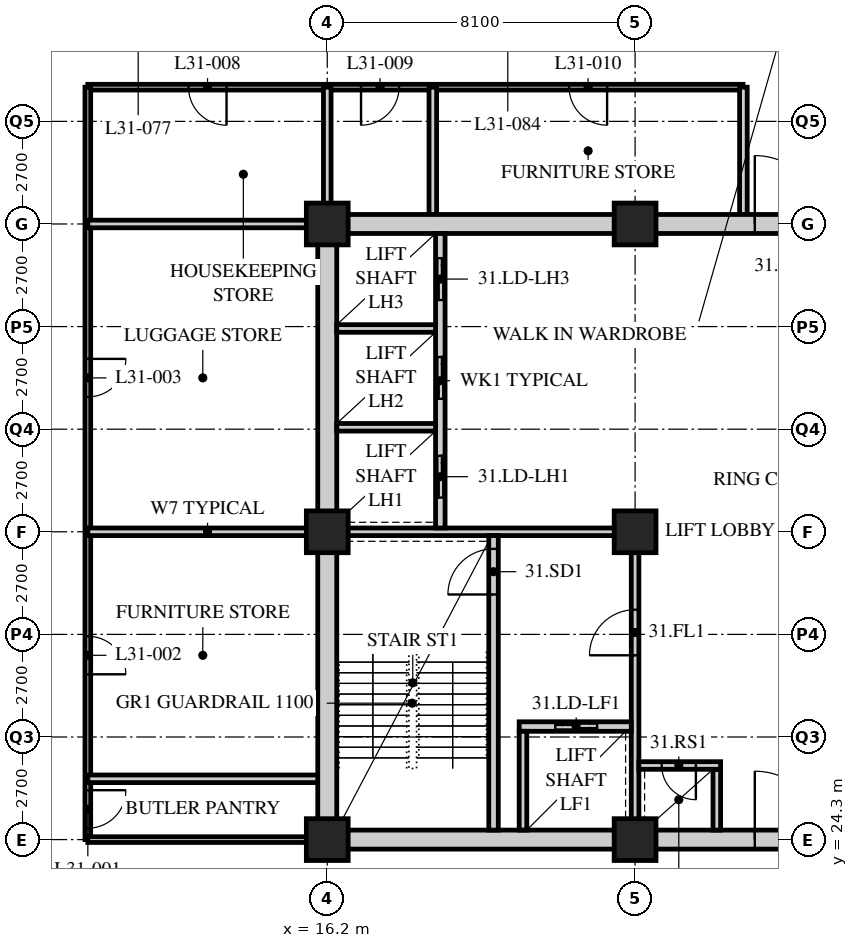
"""IFC4 building model, lengths in metres.
Left out: names, types, materials, properties, quantities, classifications, styles, units other than length and angle.
Written with IfcOpenShell. Run it as: python <this file> out.ifc"""

import sys

from ifc_helpers import new_model, si_unit, direction, frame, frame_2d, origin, origin_2d, place, context, subcontext, project, spatial, rectangle, hollow_rectangle, extrude, element, fill, save


model = new_model("IFC4")
c1 = context("Model", 3, precision=1e-05, world=origin(), true_north=direction((0.0, 1.0)))
c2 = subcontext(c1, "Body", "Model", "MODEL_VIEW")
j1 = project(units=[si_unit("LENGTHUNIT", "METRE"), si_unit("PLANEANGLEUNIT", "RADIAN")], contexts=[c1])
p1 = place(None, origin())
s1 = spatial("IfcSite", under=j1, at=p1, CompositionType="ELEMENT")
p2 = place(p1, origin())
s2 = spatial("IfcBuilding", under=s1, at=p2, CompositionType="ELEMENT")
p3 = place(p2, frame((0.0, 0.0, 123.8)))
s3 = spatial("IfcBuildingStorey", under=s2, at=p3, CompositionType="ELEMENT", Elevation=123.8)
for number, where, z_axis, x_axis in (
    (1, (16.2, 24.3, 0.0), (0.0, 0.0, 1.0), (1.0, 0.0, 0.0)),
    (2, (16.2, 32.4, 0.0), (0.0, 0.0, 1.0), (1.0, 0.0, 0.0)),
    (3, (16.2, 40.5, 0.0), (0.0, 0.0, 1.0), (1.0, 0.0, 0.0)),
    (4, (24.3, 24.3, 0.0), (0.0, 0.0, 1.0), (1.0, 0.0, 0.0)),
    (5, (24.3, 32.4, 0.0), (0.0, 0.0, 1.0), (1.0, 0.0, 0.0)),
    (6, (24.3, 40.5, 0.0), (0.0, 0.0, 1.0), (1.0, 0.0, 0.0)),
):
    element("IfcColumn", number, at=place(p3, frame(where, z_axis=z_axis, x_axis=x_axis)), inside=s3, PredefinedType="COLUMN", context=c2, shape_type="SweptSolid", body=[
        extrude(hollow_rectangle(XDim=1.1, YDim=1.1, WallThickness=0.1, at=origin_2d()), origin(), (0.0, 0.0, 1.0), 3.4),
    ])
p4 = place(p3, frame((27.14, 44.1, 0.0), z_axis=(0.0, 0.0, 1.0), x_axis=(-1.0, 0.0, 0.0)))
e7 = element("IfcWall", 7, at=p4, inside=s3, PredefinedType="PARTITIONING", context=c2, shape_type="SweptSolid", body=[
    extrude(rectangle(XDim=17.24, YDim=0.15, at=frame_2d((8.62, 0.0))), origin(), (0.0, 0.0, 1.0), 3.19),
])
p5 = place(p4, frame((13.59, 0.0, 0.0)))
e8 = element("IfcOpeningElement", 8, at=p5, cuts=e7, PredefinedType="OPENING", context=c2, shape_type="SweptSolid", body=[
    extrude(rectangle(XDim=1.0, YDim=2.1, at=frame_2d((0.5, 1.05))), frame((0.0, 0.085, 0.0), z_axis=(0.0, -1.0, 0.0), x_axis=(1.0, 0.0, 0.0)), (0.0, 0.0, 1.0), 0.17),
])
p6 = place(p4, frame((9.051, 0.0, 0.0)))
e9 = element("IfcOpeningElement", 9, at=p6, cuts=e7, PredefinedType="OPENING", context=c2, shape_type="SweptSolid", body=[
    extrude(rectangle(XDim=1.0, YDim=2.1, at=frame_2d((0.5, 1.05))), frame((0.0, 0.085, 0.0), z_axis=(0.0, -1.0, 0.0), x_axis=(1.0, 0.0, 0.0)), (0.0, 0.0, 1.0), 0.17),
])
p7 = place(p4, frame((3.576, 0.0, 0.0)))
e10 = element("IfcOpeningElement", 10, at=p7, cuts=e7, PredefinedType="OPENING", context=c2, shape_type="SweptSolid", body=[
    extrude(rectangle(XDim=1.0, YDim=2.1, at=frame_2d((0.5, 1.05))), frame((0.0, 0.085, 0.0), z_axis=(0.0, -1.0, 0.0), x_axis=(1.0, 0.0, 0.0)), (0.0, 0.0, 1.0), 0.17),
])
p8 = place(p3, frame((9.9, 44.1, 0.0), z_axis=(0.0, 0.0, 1.0), x_axis=(0.0, -1.0, 0.0)))
e11 = element("IfcWall", 11, at=p8, inside=s3, PredefinedType="PARTITIONING", context=c2, shape_type="SweptSolid", body=[
    extrude(rectangle(XDim=19.8, YDim=0.15, at=frame_2d((9.9, 0.0))), origin(), (0.0, 0.0, 1.0), 3.19),
])
p9 = place(p8, frame((18.5, 0.0, 0.0)))
e12 = element("IfcOpeningElement", 12, at=p9, cuts=e11, PredefinedType="OPENING", context=c2, shape_type="SweptSolid", body=[
    extrude(rectangle(XDim=1.0, YDim=2.1, at=frame_2d((0.5, 1.05))), frame((0.0, 0.085, 0.0), z_axis=(0.0, -1.0, 0.0), x_axis=(1.0, 0.0, 0.0)), (0.0, 0.0, 1.0), 0.17),
])
p10 = place(p8, frame((14.45, 0.0, 0.0)))
e13 = element("IfcOpeningElement", 13, at=p10, cuts=e11, PredefinedType="OPENING", context=c2, shape_type="SweptSolid", body=[
    extrude(rectangle(XDim=1.0, YDim=2.1, at=frame_2d((0.5, 1.05))), frame((0.0, 0.085, 0.0), z_axis=(0.0, -1.0, 0.0), x_axis=(1.0, 0.0, 0.0)), (0.0, 0.0, 1.0), 0.17),
])
p11 = place(p8, frame((7.15, 0.0, 0.0)))
e14 = element("IfcOpeningElement", 14, at=p11, cuts=e11, PredefinedType="OPENING", context=c2, shape_type="SweptSolid", body=[
    extrude(rectangle(XDim=1.0, YDim=2.1, at=frame_2d((0.5, 1.05))), frame((0.0, 0.085, 0.0), z_axis=(0.0, -1.0, 0.0), x_axis=(1.0, 0.0, 0.0)), (0.0, 0.0, 1.0), 0.17),
])
p12 = place(p3, frame((9.9, 24.3, 0.0), z_axis=(0.0, 0.0, 1.0), x_axis=(1.0, 0.0, 0.0)))
e15 = element("IfcWall", 15, at=p12, inside=s3, PredefinedType="PARTITIONING", context=c2, shape_type="SweptSolid", body=[
    extrude(rectangle(XDim=6.1, YDim=0.15, at=frame_2d((3.05, 0.0))), origin(), (0.0, 0.0, 1.0), 3.19),
])
for number, where, z_axis, x_axis in (
    (16, (9.9, 32.4, 0.0), (0.0, 0.0, 1.0), (1.0, 0.0, 0.0)),
    (17, (9.9, 25.9, 0.0), (0.0, 0.0, 1.0), (1.0, 0.0, 0.0)),
):
    element("IfcWall", number, at=place(p3, frame(where, z_axis=z_axis, x_axis=x_axis)), inside=s3, PredefinedType="SOLIDWALL", context=c2, shape_type="SweptSolid", body=[
        extrude(rectangle(XDim=6.3, YDim=0.2, at=frame_2d((3.15, 0.0))), origin(), (0.0, 0.0, 1.0), 3.19),
    ])
p13 = place(p3, frame((16.2, 40.5, 0.0), z_axis=(0.0, 0.0, 1.0), x_axis=(0.0, 1.0, 0.0)))
e18 = element("IfcWall", 18, at=p13, inside=s3, PredefinedType="SOLIDWALL", context=c2, shape_type="SweptSolid", body=[
    extrude(rectangle(XDim=3.6, YDim=0.2, at=frame_2d((1.8, 0.0))), origin(), (0.0, 0.0, 1.0), 2.578),
])
for number, where, z_axis, x_axis in (
    (19, (18.978, 44.1, 0.0), (0.0, 0.0, 1.0), (0.0, -1.0, 0.0)),
    (20, (27.15, 40.5, 0.0), (0.0, 0.0, 1.0), (0.0, 1.0, 0.0)),
):
    element("IfcWall", number, at=place(p3, frame(where, z_axis=z_axis, x_axis=x_axis)), inside=s3, PredefinedType="SOLIDWALL", context=c2, shape_type="SweptSolid", body=[
        extrude(rectangle(XDim=3.6, YDim=0.2, at=frame_2d((1.8, 0.0))), origin(), (0.0, 0.0, 1.0), 3.19),
    ])
p14 = place(p3, frame((9.9, 40.5, 0.0), z_axis=(0.0, 0.0, 1.0), x_axis=(1.0, 0.0, 0.0)))
e21 = element("IfcWall", 21, at=p14, inside=s3, PredefinedType="SOLIDWALL", context=c2, shape_type="SweptSolid", body=[
    extrude(rectangle(XDim=6.3, YDim=0.2, at=frame_2d((3.15, 0.0))), origin(), (0.0, 0.0, 1.0), 3.19),
])
p15 = place(p3, frame((15.95, 24.3, 0.0), z_axis=(0.0, 0.0, 1.0), x_axis=(1.0, 0.0, 0.0)))
e22 = element("IfcWall", 22, at=p15, inside=s3, PredefinedType="SOLIDWALL", context=c2, shape_type="SweptSolid", body=[
    extrude(rectangle(XDim=24.8, YDim=0.5, at=frame_2d((12.4, 0.0))), origin(), (0.0, 0.0, 1.0), 2.54),
])
p16 = place(p15, frame((11.5, 0.0, 0.0)))
e23 = element("IfcOpeningElement", 23, at=p16, cuts=e22, PredefinedType="OPENING", context=c2, shape_type="SweptSolid", body=[
    extrude(rectangle(XDim=1.8, YDim=2.4, at=frame_2d((0.9, 1.2))), frame((0.0, 0.26, 0.0), z_axis=(0.0, -1.0, 0.0), x_axis=(1.0, 0.0, 0.0)), (0.0, 0.0, 1.0), 0.52),
])
p17 = place(p3, frame((15.95, 40.5, 0.0), z_axis=(0.0, 0.0, 1.0), x_axis=(1.0, 0.0, 0.0)))
e24 = element("IfcWall", 24, at=p17, inside=s3, PredefinedType="SOLIDWALL", context=c2, shape_type="SweptSolid", body=[
    extrude(rectangle(XDim=24.8, YDim=0.5, at=frame_2d((12.4, 0.0))), origin(), (0.0, 0.0, 1.0), 2.54),
])
p18 = place(p17, frame((11.5, 0.0, 0.0)))
e25 = element("IfcOpeningElement", 25, at=p18, cuts=e24, PredefinedType="OPENING", context=c2, shape_type="SweptSolid", body=[
    extrude(rectangle(XDim=1.8, YDim=2.4, at=frame_2d((0.9, 1.2))), frame((0.0, 0.26, 0.0), z_axis=(0.0, -1.0, 0.0), x_axis=(1.0, 0.0, 0.0)), (0.0, 0.0, 1.0), 0.52),
])
p19 = place(p3, frame((16.2, 24.55, 0.0), z_axis=(0.0, 0.0, 1.0), x_axis=(0.0, 1.0, 0.0)))
e26 = element("IfcWall", 26, at=p19, inside=s3, PredefinedType="SOLIDWALL", context=c2, shape_type="SweptSolid", body=[
    extrude(rectangle(XDim=15.7, YDim=0.5, at=frame_2d((7.85, 0.0))), origin(), (0.0, 0.0, 1.0), 2.578),
])
p20 = place(p3, frame((16.45, 32.4, 0.0), z_axis=(0.0, 0.0, 1.0), x_axis=(1.0, 0.0, 0.0)))
e27 = element("IfcWall", 27, at=p20, inside=s3, PredefinedType="SOLIDWALL", context=c2, shape_type="SweptSolid", body=[
    extrude(rectangle(XDim=7.95, YDim=0.2, at=frame_2d((3.975, 0.0))), origin(), (0.0, 0.0, 1.0), 2.578),
])
p21 = place(p3, frame((24.3, 24.55, 0.0), z_axis=(0.0, 0.0, 1.0), x_axis=(0.0, 1.0, 0.0)))
e28 = element("IfcWall", 28, at=p21, inside=s3, PredefinedType="SOLIDWALL", context=c2, shape_type="SweptSolid", body=[
    extrude(rectangle(XDim=7.75, YDim=0.2, at=frame_2d((3.875, 0.0))), origin(), (0.0, 0.0, 1.0), 2.578),
])
p22 = place(p21, frame((4.6, 0.0, 0.0)))
e29 = element("IfcOpeningElement", 29, at=p22, cuts=e28, PredefinedType="OPENING", context=c2, shape_type="SweptSolid", body=[
    extrude(rectangle(XDim=1.2, YDim=2.1, at=frame_2d((0.6, 1.05))), frame((0.0, 0.11, 0.0), z_axis=(0.0, -1.0, 0.0), x_axis=(1.0, 0.0, 0.0)), (0.0, 0.0, 1.0), 0.22),
])
p23 = place(p3, frame((20.575, 24.55, 0.0), z_axis=(0.0, 0.0, 1.0), x_axis=(0.0, 1.0, 0.0)))
e30 = element("IfcWall", 30, at=p23, inside=s3, PredefinedType="SOLIDWALL", context=c2, shape_type="SweptSolid", body=[
    extrude(rectangle(XDim=7.75, YDim=0.25, at=frame_2d((3.875, 0.0))), origin(), (0.0, 0.0, 1.0), 3.19),
])
p24 = place(p23, frame((6.2, 0.0, 0.0)))
e31 = element("IfcOpeningElement", 31, at=p24, cuts=e30, PredefinedType="OPENING", context=c2, shape_type="SweptSolid", body=[
    extrude(rectangle(XDim=1.2, YDim=2.1, at=frame_2d((0.6, 1.05))), frame((0.0, 0.135, 0.0), z_axis=(0.0, -1.0, 0.0), x_axis=(1.0, 0.0, 0.0)), (0.0, 0.0, 1.0), 0.27),
])
p25 = place(p3, frame((21.25, 27.275, 0.0), z_axis=(0.0, 0.0, 1.0), x_axis=(1.0, 0.0, 0.0)))
e32 = element("IfcWall", 32, at=p25, inside=s3, PredefinedType="SOLIDWALL", context=c2, shape_type="SweptSolid", body=[
    extrude(rectangle(XDim=2.95, YDim=0.25, at=frame_2d((1.475, 0.0))), origin(), (0.0, 0.0, 1.0), 3.19),
])
p26 = place(p25, frame((0.95, 0.0, 0.0)))
e33 = element("IfcOpeningElement", 33, at=p26, cuts=e32, PredefinedType="OPENING", context=c2, shape_type="SweptSolid", body=[
    extrude(rectangle(XDim=1.1, YDim=2.4, at=frame_2d((0.55, 1.2))), frame((0.0, 0.135, 0.0), z_axis=(0.0, -1.0, 0.0), x_axis=(1.0, 0.0, 0.0)), (0.0, 0.0, 1.0), 0.27),
])
p27 = place(p3, frame((21.35, 24.55, 0.0), z_axis=(0.0, 0.0, 1.0), x_axis=(0.0, 1.0, 0.0)))
e34 = element("IfcWall", 34, at=p27, inside=s3, PredefinedType="SOLIDWALL", context=c2, shape_type="SweptSolid", body=[
    extrude(rectangle(XDim=2.6, YDim=0.2, at=frame_2d((1.3, 0.0))), origin(), (0.0, 0.0, 1.0), 3.19),
])
p28 = place(p3, frame((19.175, 32.5, 0.0), z_axis=(0.0, 0.0, 1.0), x_axis=(0.0, 1.0, 0.0)))
e35 = element("IfcWall", 35, at=p28, inside=s3, PredefinedType="SOLIDWALL", context=c2, shape_type="SweptSolid", body=[
    extrude(rectangle(XDim=7.75, YDim=0.25, at=frame_2d((3.875, 0.0))), origin(), (0.0, 0.0, 1.0), 3.19),
])
p29 = place(p28, frame((0.8, 0.0, 0.0)))
e36 = element("IfcOpeningElement", 36, at=p29, cuts=e35, PredefinedType="OPENING", context=c2, shape_type="SweptSolid", body=[
    extrude(rectangle(XDim=1.1, YDim=2.4, at=frame_2d((0.55, 1.2))), frame((0.0, 0.135, 0.0), z_axis=(0.0, -1.0, 0.0), x_axis=(1.0, 0.0, 0.0)), (0.0, 0.0, 1.0), 0.27),
])
p30 = place(p28, frame((3.4, 0.0, 0.0)))
e37 = element("IfcOpeningElement", 37, at=p30, cuts=e35, PredefinedType="OPENING", context=c2, shape_type="SweptSolid", body=[
    extrude(rectangle(XDim=1.1, YDim=2.4, at=frame_2d((0.55, 1.2))), frame((0.0, 0.135, 0.0), z_axis=(0.0, -1.0, 0.0), x_axis=(1.0, 0.0, 0.0)), (0.0, 0.0, 1.0), 0.27),
])
p31 = place(p28, frame((6.0, 0.0, 0.0)))
e38 = element("IfcOpeningElement", 38, at=p31, cuts=e35, PredefinedType="OPENING", context=c2, shape_type="SweptSolid", body=[
    extrude(rectangle(XDim=1.1, YDim=2.4, at=frame_2d((0.55, 1.2))), frame((0.0, 0.135, 0.0), z_axis=(0.0, -1.0, 0.0), x_axis=(1.0, 0.0, 0.0)), (0.0, 0.0, 1.0), 0.27),
])
for number, where, z_axis, x_axis in (
    (39, (16.45, 35.15, 0.0), (0.0, 0.0, 1.0), (1.0, 0.0, 0.0)),
    (40, (16.45, 37.75, 0.0), (0.0, 0.0, 1.0), (1.0, 0.0, 0.0)),
):
    element("IfcWall", number, at=place(p3, frame(where, z_axis=z_axis, x_axis=x_axis)), inside=s3, PredefinedType="SOLIDWALL", context=c2, shape_type="SweptSolid", body=[
        extrude(rectangle(XDim=2.6, YDim=0.2, at=frame_2d((1.3, 0.0))), origin(), (0.0, 0.0, 1.0), 3.19),
    ])
p32 = place(p3, frame((26.45, 24.55, 0.0), z_axis=(0.0, 0.0, 1.0), x_axis=(0.0, 1.0, 0.0)))
e41 = element("IfcWall", 41, at=p32, inside=s3, PredefinedType="SOLIDWALL", context=c2, shape_type="SweptSolid", body=[
    extrude(rectangle(XDim=1.6, YDim=0.2, at=frame_2d((0.8, 0.0))), origin(), (0.0, 0.0, 1.0), 3.19),
])
p33 = place(p3, frame((24.4, 26.25, 0.0), z_axis=(0.0, 0.0, 1.0), x_axis=(1.0, 0.0, 0.0)))
e42 = element("IfcWall", 42, at=p33, inside=s3, PredefinedType="SOLIDWALL", context=c2, shape_type="SweptSolid", body=[
    extrude(rectangle(XDim=2.15, YDim=0.2, at=frame_2d((1.075, 0.0))), origin(), (0.0, 0.0, 1.0), 3.19),
])
p34 = place(p33, frame((0.6, 0.0, 0.0)))
e43 = element("IfcOpeningElement", 43, at=p34, cuts=e42, PredefinedType="OPENING", context=c2, shape_type="SweptSolid", body=[
    extrude(rectangle(XDim=0.9, YDim=2.1, at=frame_2d((0.45, 1.05))), frame((0.0, 0.11, 0.0), z_axis=(0.0, -1.0, 0.0), x_axis=(1.0, 0.0, 0.0)), (0.0, 0.0, 1.0), 0.22),
])
p35 = place(p9, origin())
e44 = element("IfcDoor", 44, at=p35, inside=s3, OperationType="SINGLE_SWING_LEFT", PredefinedType="DOOR", context=c2, shape_type="SweptSolid", body=[
    extrude(rectangle(XDim=1.0, YDim=2.1, at=frame_2d((0.5, 1.05))), frame((0.0, 0.025, 0.0), z_axis=(0.0, -1.0, 0.0), x_axis=(1.0, 0.0, 0.0)), (0.0, 0.0, 1.0), 0.05),
])
fill(e12, e44)
p36 = place(p10, origin())
e45 = element("IfcDoor", 45, at=p36, inside=s3, OperationType="SINGLE_SWING_RIGHT", PredefinedType="DOOR", context=c2, shape_type="SweptSolid", body=[
    extrude(rectangle(XDim=1.0, YDim=2.1, at=frame_2d((0.5, 1.05))), frame((0.0, 0.025, 0.0), z_axis=(0.0, -1.0, 0.0), x_axis=(1.0, 0.0, 0.0)), (0.0, 0.0, 1.0), 0.05),
])
fill(e13, e45)
p37 = place(p11, origin())
e46 = element("IfcDoor", 46, at=p37, inside=s3, OperationType="SINGLE_SWING_LEFT", PredefinedType="DOOR", context=c2, shape_type="SweptSolid", body=[
    extrude(rectangle(XDim=1.0, YDim=2.1, at=frame_2d((0.5, 1.05))), frame((0.0, 0.025, 0.0), z_axis=(0.0, -1.0, 0.0), x_axis=(1.0, 0.0, 0.0)), (0.0, 0.0, 1.0), 0.05),
])
fill(e14, e46)
p38 = place(p5, origin())
e47 = element("IfcDoor", 47, at=p38, inside=s3, OperationType="SINGLE_SWING_LEFT", PredefinedType="DOOR", context=c2, shape_type="SweptSolid", body=[
    extrude(rectangle(XDim=1.0, YDim=2.1, at=frame_2d((0.5, 1.05))), frame((0.0, 0.025, 0.0), z_axis=(0.0, -1.0, 0.0), x_axis=(1.0, 0.0, 0.0)), (0.0, 0.0, 1.0), 0.05),
])
fill(e8, e47)
p39 = place(p6, origin())
e48 = element("IfcDoor", 48, at=p39, inside=s3, OperationType="SINGLE_SWING_RIGHT", PredefinedType="DOOR", context=c2, shape_type="SweptSolid", body=[
    extrude(rectangle(XDim=1.0, YDim=2.1, at=frame_2d((0.5, 1.05))), frame((0.0, 0.025, 0.0), z_axis=(0.0, -1.0, 0.0), x_axis=(1.0, 0.0, 0.0)), (0.0, 0.0, 1.0), 0.05),
])
fill(e9, e48)
p40 = place(p7, origin())
e49 = element("IfcDoor", 49, at=p40, inside=s3, OperationType="SINGLE_SWING_LEFT", PredefinedType="DOOR", context=c2, shape_type="SweptSolid", body=[
    extrude(rectangle(XDim=1.0, YDim=2.1, at=frame_2d((0.5, 1.05))), frame((0.0, 0.025, 0.0), z_axis=(0.0, -1.0, 0.0), x_axis=(1.0, 0.0, 0.0)), (0.0, 0.0, 1.0), 0.05),
])
fill(e10, e49)
p41 = place(p24, origin())
e50 = element("IfcDoor", 50, at=p41, inside=s3, OperationType="SINGLE_SWING_LEFT", PredefinedType="DOOR", context=c2, shape_type="SweptSolid", body=[
    extrude(rectangle(XDim=1.2, YDim=2.1, at=frame_2d((0.6, 1.05))), frame((0.0, 0.025, 0.0), z_axis=(0.0, -1.0, 0.0), x_axis=(1.0, 0.0, 0.0)), (0.0, 0.0, 1.0), 0.05),
])
fill(e31, e50)
p42 = place(p22, origin())
e51 = element("IfcDoor", 51, at=p42, inside=s3, OperationType="SINGLE_SWING_LEFT", PredefinedType="DOOR", context=c2, shape_type="SweptSolid", body=[
    extrude(rectangle(XDim=1.2, YDim=2.1, at=frame_2d((0.6, 1.05))), frame((0.0, 0.025, 0.0), z_axis=(0.0, -1.0, 0.0), x_axis=(1.0, 0.0, 0.0)), (0.0, 0.0, 1.0), 0.05),
])
fill(e29, e51)
p43 = place(p34, origin())
e52 = element("IfcDoor", 52, at=p43, inside=s3, OperationType="SINGLE_SWING_LEFT", PredefinedType="DOOR", context=c2, shape_type="SweptSolid", body=[
    extrude(rectangle(XDim=0.9, YDim=2.1, at=frame_2d((0.45, 1.05))), frame((0.0, 0.025, 0.0), z_axis=(0.0, -1.0, 0.0), x_axis=(1.0, 0.0, 0.0)), (0.0, 0.0, 1.0), 0.05),
])
fill(e43, e52)
p44 = place(p29, origin())
e53 = element("IfcDoor", 53, at=p44, inside=s3, OperationType="DOUBLE_DOOR_SLIDING", PredefinedType="DOOR", context=c2, shape_type="SweptSolid", body=[
    extrude(rectangle(XDim=1.1, YDim=2.4, at=frame_2d((0.55, 1.2))), frame((0.0, 0.025, 0.0), z_axis=(0.0, -1.0, 0.0), x_axis=(1.0, 0.0, 0.0)), (0.0, 0.0, 1.0), 0.05),
])
fill(e36, e53)
p45 = place(p30, origin())
e54 = element("IfcDoor", 54, at=p45, inside=s3, OperationType="DOUBLE_DOOR_SLIDING", PredefinedType="DOOR", context=c2, shape_type="SweptSolid", body=[
    extrude(rectangle(XDim=1.1, YDim=2.4, at=frame_2d((0.55, 1.2))), frame((0.0, 0.025, 0.0), z_axis=(0.0, -1.0, 0.0), x_axis=(1.0, 0.0, 0.0)), (0.0, 0.0, 1.0), 0.05),
])
fill(e37, e54)
p46 = place(p31, origin())
e55 = element("IfcDoor", 55, at=p46, inside=s3, OperationType="DOUBLE_DOOR_SLIDING", PredefinedType="DOOR", context=c2, shape_type="SweptSolid", body=[
    extrude(rectangle(XDim=1.1, YDim=2.4, at=frame_2d((0.55, 1.2))), frame((0.0, 0.025, 0.0), z_axis=(0.0, -1.0, 0.0), x_axis=(1.0, 0.0, 0.0)), (0.0, 0.0, 1.0), 0.05),
])
fill(e38, e55)
p47 = place(p26, origin())
e56 = element("IfcDoor", 56, at=p47, inside=s3, OperationType="DOUBLE_DOOR_SLIDING", PredefinedType="DOOR", context=c2, shape_type="SweptSolid", body=[
    extrude(rectangle(XDim=1.1, YDim=2.4, at=frame_2d((0.55, 1.2))), frame((0.0, 0.025, 0.0), z_axis=(0.0, -1.0, 0.0), x_axis=(1.0, 0.0, 0.0)), (0.0, 0.0, 1.0), 0.05),
])
fill(e33, e56)
p48 = place(p16, origin())
e57 = element("IfcDoor", 57, at=p48, inside=s3, OperationType="DOUBLE_DOOR_SINGLE_SWING", PredefinedType="DOOR", context=c2, shape_type="SweptSolid", body=[
    extrude(rectangle(XDim=1.8, YDim=2.4, at=frame_2d((0.9, 1.2))), frame((0.0, 0.025, 0.0), z_axis=(0.0, -1.0, 0.0), x_axis=(1.0, 0.0, 0.0)), (0.0, 0.0, 1.0), 0.05),
])
fill(e23, e57)
p49 = place(p18, origin())
e58 = element("IfcDoor", 58, at=p49, inside=s3, OperationType="DOUBLE_DOOR_SINGLE_SWING", PredefinedType="DOOR", context=c2, shape_type="SweptSolid", body=[
    extrude(rectangle(XDim=1.8, YDim=2.4, at=frame_2d((0.9, 1.2))), frame((0.0, 0.025, 0.0), z_axis=(0.0, -1.0, 0.0), x_axis=(1.0, 0.0, 0.0)), (0.0, 0.0, 1.0), 0.05),
])
fill(e25, e58)
save(model, sys.argv[1])
